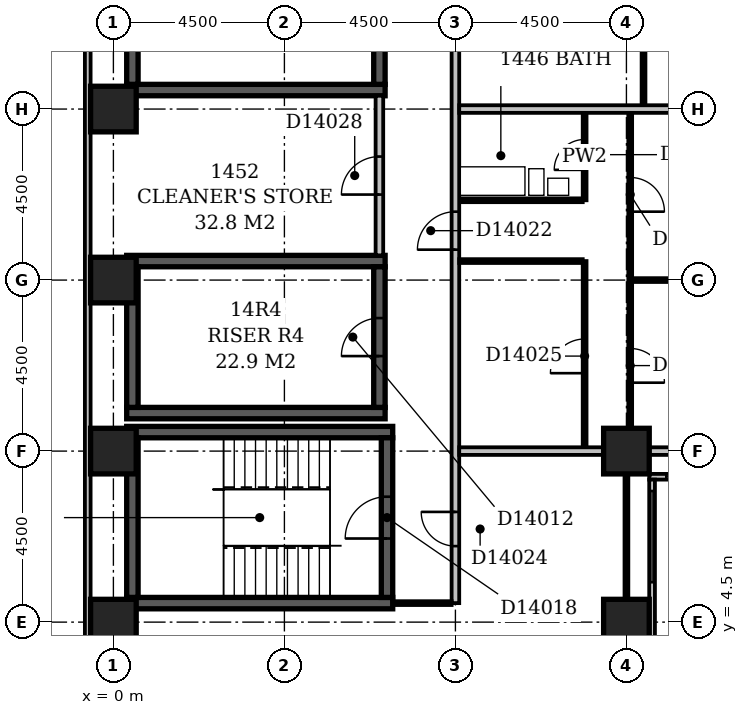
"""IFC4 building model, lengths in metres.
Left out: names, types, materials, properties, quantities, classifications, styles, units other than length and angle.
Written with IfcOpenShell. Run it as: python <this file> out.ifc"""

import sys

from ifc_helpers import new_model, si_unit, direction, frame, frame_2d, origin, origin_2d, place, context, subcontext, project, spatial, rectangle, extrude, element, fill, save


model = new_model("IFC4")
c1 = context("Model", 3, precision=1e-05, world=origin(), true_north=direction((0.0, 1.0)))
c2 = subcontext(c1, "Body", "Model", "MODEL_VIEW")
j1 = project(units=[si_unit("LENGTHUNIT", "METRE"), si_unit("PLANEANGLEUNIT", "RADIAN")], contexts=[c1])
p1 = place(None, origin())
s1 = spatial("IfcSite", under=j1, at=p1, CompositionType="ELEMENT")
p2 = place(p1, origin())
s2 = spatial("IfcBuilding", under=s1, at=p2, CompositionType="ELEMENT")
p3 = place(p2, frame((0.0, 0.0, 61.4)))
s3 = spatial("IfcBuildingStorey", under=s2, at=p3, CompositionType="ELEMENT", Elevation=61.4)
for number, where, z_axis, x_axis in (
    (1, (0.35, 5.0, -0.3), (0.0, 0.0, 1.0), (1.0, 0.0, 0.0)),
    (2, (0.35, 9.5, -0.3), (0.0, 0.0, 1.0), (1.0, 0.0, 0.0)),
):
    element("IfcWall", number, at=place(p3, frame(where, z_axis=z_axis, x_axis=x_axis)), inside=s3, PredefinedType="SHEAR", context=c2, shape_type="SweptSolid", body=[
        extrude(rectangle(XDim=7.0, YDim=0.3, at=frame_2d((3.5, 0.0))), origin(), (0.0, 0.0, 1.0), 3.6),
    ])
for number, where, z_axis, x_axis in (
    (3, (0.35, 10.0, -0.3), (0.0, 0.0, 1.0), (1.0, 0.0, 0.0)),
    (4, (0.35, 14.0, -0.3), (0.0, 0.0, 1.0), (1.0, 0.0, 0.0)),
    (5, (0.35, 18.5, -0.3), (0.0, 0.0, 1.0), (1.0, 0.0, 0.0)),
):
    element("IfcWall", number, at=place(p3, frame(where, z_axis=z_axis, x_axis=x_axis)), inside=s3, PredefinedType="SHEAR", context=c2, shape_type="SweptSolid", body=[
        extrude(rectangle(XDim=6.8, YDim=0.3, at=frame_2d((3.4, 0.0))), origin(), (0.0, 0.0, 1.0), 3.6),
    ])
p4 = place(p3, frame((0.5, 5.15, -0.3), z_axis=(0.0, 0.0, 1.0), x_axis=(0.0, 1.0, 0.0)))
e6 = element("IfcWall", 6, at=p4, inside=s3, PredefinedType="SHEAR", context=c2, shape_type="SweptSolid", body=[
    extrude(rectangle(XDim=4.2, YDim=0.3, at=frame_2d((2.1, 0.0))), origin(), (0.0, 0.0, 1.0), 3.6),
])
for number, where, z_axis, x_axis in (
    (7, (0.5, 10.15, -0.3), (0.0, 0.0, 1.0), (0.0, 1.0, 0.0)),
    (8, (0.5, 18.65, -0.3), (0.0, 0.0, 1.0), (0.0, 1.0, 0.0)),
):
    element("IfcWall", number, at=place(p3, frame(where, z_axis=z_axis, x_axis=x_axis)), inside=s3, PredefinedType="SHEAR", context=c2, shape_type="SweptSolid", body=[
        extrude(rectangle(XDim=3.7, YDim=0.3, at=frame_2d((1.85, 0.0))), origin(), (0.0, 0.0, 1.0), 3.6),
    ])
p5 = place(p3, frame((7.0, 10.15, -0.3), z_axis=(0.0, 0.0, 1.0), x_axis=(0.0, 1.0, 0.0)))
e9 = element("IfcWall", 9, at=p5, inside=s3, PredefinedType="SHEAR", context=c2, shape_type="SweptSolid", body=[
    extrude(rectangle(XDim=3.7, YDim=0.3, at=frame_2d((1.85, 0.0))), origin(), (0.0, 0.0, 1.0), 3.6),
])
p6 = place(p5, frame((1.35, 0.0, 0.3)))
e10 = element("IfcOpeningElement", 10, at=p6, cuts=e9, PredefinedType="OPENING", context=c2, shape_type="SweptSolid", body=[
    extrude(rectangle(XDim=1.0, YDim=2.1, at=frame_2d((0.5, 1.05))), frame((0.0, 0.162, 0.0), z_axis=(0.0, -1.0, 0.0), x_axis=(1.0, 0.0, 0.0)), (0.0, 0.0, 1.0), 0.324),
])
p7 = place(p3, frame((7.0, 18.65, -0.3), z_axis=(0.0, 0.0, 1.0), x_axis=(0.0, 1.0, 0.0)))
e11 = element("IfcWall", 11, at=p7, inside=s3, PredefinedType="SHEAR", context=c2, shape_type="SweptSolid", body=[
    extrude(rectangle(XDim=3.7, YDim=0.3, at=frame_2d((1.85, 0.0))), origin(), (0.0, 0.0, 1.0), 3.6),
])
p8 = place(p7, frame((1.35, 0.0, 0.3)))
e12 = element("IfcOpeningElement", 12, at=p8, cuts=e11, PredefinedType="OPENING", context=c2, shape_type="SweptSolid", body=[
    extrude(rectangle(XDim=1.0, YDim=2.1, at=frame_2d((0.5, 1.05))), frame((0.0, 0.162, 0.0), z_axis=(0.0, -1.0, 0.0), x_axis=(1.0, 0.0, 0.0)), (0.0, 0.0, 1.0), 0.324),
])
p9 = place(p3, frame((7.2, 5.15, -0.3), z_axis=(0.0, 0.0, 1.0), x_axis=(0.0, 1.0, 0.0)))
e13 = element("IfcWall", 13, at=p9, inside=s3, PredefinedType="SHEAR", context=c2, shape_type="SweptSolid", body=[
    extrude(rectangle(XDim=4.2, YDim=0.3, at=frame_2d((2.1, 0.0))), origin(), (0.0, 0.0, 1.0), 3.6),
])
p10 = place(p9, frame((1.55, 0.0, 0.3)))
e14 = element("IfcOpeningElement", 14, at=p10, cuts=e13, PredefinedType="OPENING", context=c2, shape_type="SweptSolid", body=[
    extrude(rectangle(XDim=1.1, YDim=2.1, at=frame_2d((0.55, 1.05))), frame((0.0, 0.162, 0.0), z_axis=(0.0, -1.0, 0.0), x_axis=(1.0, 0.0, 0.0)), (0.0, 0.0, 1.0), 0.324),
])
for number, where, z_axis, x_axis in (
    (15, (0.0, 4.5, -0.3), (0.0, 0.0, 1.0), (1.0, 0.0, 0.0)),
    (16, (13.5, 4.5, -0.3), (0.0, 0.0, 1.0), (1.0, 0.0, 0.0)),
    (17, (0.0, 9.0, -0.3), (0.0, 0.0, 1.0), (1.0, 0.0, 0.0)),
    (18, (13.5, 9.0, -0.3), (0.0, 0.0, 1.0), (1.0, 0.0, 0.0)),
    (19, (0.0, 13.5, -0.3), (0.0, 0.0, 1.0), (1.0, 0.0, 0.0)),
    (20, (0.0, 18.0, -0.3), (0.0, 0.0, 1.0), (1.0, 0.0, 0.0)),
):
    element("IfcColumn", number, at=place(p3, frame(where, z_axis=z_axis, x_axis=x_axis)), inside=s3, PredefinedType="COLUMN", context=c2, shape_type="SweptSolid", body=[
        extrude(rectangle(XDim=1.2, YDim=1.2, at=origin_2d()), origin(), (0.0, 0.0, 1.0), 3.6),
    ])
p11 = place(p3, frame((14.175, 3.9, 0.0), z_axis=(0.0, 0.0, 1.0), x_axis=(0.0, 1.0, 0.0)))
e21 = element("IfcWall", 21, at=p11, inside=s3, PredefinedType="STANDARD", context=c2, shape_type="SweptSolid", body=[
    extrude(rectangle(XDim=4.35, YDim=0.15, at=frame_2d((2.175, 0.0))), origin(), (0.0, 0.0, 1.0), 2.7),
])
p12 = place(p11, frame((1.65, 0.0, 0.6)))
e22 = element("IfcOpeningElement", 22, at=p12, cuts=e21, PredefinedType="OPENING", context=c2, shape_type="SweptSolid", body=[
    extrude(rectangle(XDim=2.4, YDim=1.8, at=frame_2d((1.2, 0.9))), frame((0.0, 0.087, 0.0), z_axis=(0.0, -1.0, 0.0), x_axis=(1.0, 0.0, 0.0)), (0.0, 0.0, 1.0), 0.174),
])
p13 = place(p3, frame((14.1, 8.325, 0.0), z_axis=(0.0, 0.0, 1.0), x_axis=(1.0, 0.0, 0.0)))
e23 = element("IfcWall", 23, at=p13, inside=s3, PredefinedType="STANDARD", context=c2, shape_type="SweptSolid", body=[
    extrude(rectangle(XDim=4.65, YDim=0.15, at=frame_2d((2.325, 0.0))), origin(), (0.0, 0.0, 1.0), 2.7),
])
p14 = place(p13, frame((0.45, 0.0, 0.6)))
e24 = element("IfcOpeningElement", 24, at=p14, cuts=e23, PredefinedType="OPENING", context=c2, shape_type="SweptSolid", body=[
    extrude(rectangle(XDim=2.4, YDim=1.8, at=frame_2d((1.2, 0.9))), frame((0.0, 0.087, 0.0), z_axis=(0.0, -1.0, 0.0), x_axis=(1.0, 0.0, 0.0)), (0.0, 0.0, 1.0), 0.174),
])
p15 = place(p3, frame((-0.675, 59.1, 0.0), z_axis=(0.0, 0.0, 1.0), x_axis=(0.0, -1.0, 0.0)))
e25 = element("IfcWall", 25, at=p15, inside=s3, PredefinedType="STANDARD", context=c2, shape_type="SweptSolid", body=[
    extrude(rectangle(XDim=55.35, YDim=0.15, at=frame_2d((27.675, 0.0))), origin(), (0.0, 0.0, 1.0), 2.7),
])
p16 = place(p15, frame((10.65, 0.0, 0.6)))
e26 = element("IfcOpeningElement", 26, at=p16, cuts=e25, PredefinedType="OPENING", context=c2, shape_type="SweptSolid", body=[
    extrude(rectangle(XDim=2.4, YDim=1.8, at=frame_2d((1.2, 0.9))), frame((0.0, 0.087, 0.0), z_axis=(0.0, -1.0, 0.0), x_axis=(1.0, 0.0, 0.0)), (0.0, 0.0, 1.0), 0.174),
])
p17 = place(p15, frame((15.15, 0.0, 0.6)))
e27 = element("IfcOpeningElement", 27, at=p17, cuts=e25, PredefinedType="OPENING", context=c2, shape_type="SweptSolid", body=[
    extrude(rectangle(XDim=2.4, YDim=1.8, at=frame_2d((1.2, 0.9))), frame((0.0, 0.087, 0.0), z_axis=(0.0, -1.0, 0.0), x_axis=(1.0, 0.0, 0.0)), (0.0, 0.0, 1.0), 0.174),
])
p18 = place(p15, frame((20.67, 0.0, 0.6)))
e28 = element("IfcOpeningElement", 28, at=p18, cuts=e25, PredefinedType="OPENING", context=c2, shape_type="SweptSolid", body=[
    extrude(rectangle(XDim=1.5, YDim=1.8, at=frame_2d((0.75, 0.9))), frame((0.0, 0.087, 0.0), z_axis=(0.0, -1.0, 0.0), x_axis=(1.0, 0.0, 0.0)), (0.0, 0.0, 1.0), 0.174),
])
p19 = place(p3, frame((0.0, 4.4, 0.0), z_axis=(0.0, 0.0, 1.0), x_axis=(0.0, 1.0, 0.0)))
e29 = element("IfcWall", 29, at=p19, inside=s3, PredefinedType="PARTITIONING", context=c2, shape_type="SweptSolid", body=[
    extrude(rectangle(XDim=0.7, YDim=0.1, at=frame_2d((0.35, 0.0))), origin(), (0.0, 0.0, 1.0), 2.7),
])
p20 = place(p3, frame((7.349, 5.0, 0.0), z_axis=(0.0, 0.0, 1.0), x_axis=(1.0, 0.0, 0.0)))
e30 = element("IfcWall", 30, at=p20, inside=s3, PredefinedType="PARTITIONING", context=c2, shape_type="SweptSolid", body=[
    extrude(rectangle(XDim=1.551, YDim=0.1, at=frame_2d((0.775, 0.0))), origin(), (0.0, 0.0, 1.0), 3.3),
])
p21 = place(p3, frame((9.0, 5.0, 0.0), z_axis=(0.0, 0.0, 1.0), x_axis=(0.0, 1.0, 0.0)))
e31 = element("IfcWall", 31, at=p21, inside=s3, PredefinedType="PARTITIONING", context=c2, shape_type="SweptSolid", body=[
    extrude(rectangle(XDim=44.5, YDim=0.2, at=frame_2d((22.25, 0.0))), origin(), (0.0, 0.0, 1.0), 3.3),
])
p22 = place(p21, frame((28.05, 0.0, 0.0)))
e32 = element("IfcOpeningElement", 32, at=p22, cuts=e31, PredefinedType="OPENING", context=c2, shape_type="SweptSolid", body=[
    extrude(rectangle(XDim=1.0, YDim=2.1, at=frame_2d((0.5, 1.05))), frame((0.0, 0.112, 0.0), z_axis=(0.0, -1.0, 0.0), x_axis=(1.0, 0.0, 0.0)), (0.0, 0.0, 1.0), 0.224),
])
p23 = place(p21, frame((23.95, 0.0, 0.0)))
e33 = element("IfcOpeningElement", 33, at=p23, cuts=e31, PredefinedType="OPENING", context=c2, shape_type="SweptSolid", body=[
    extrude(rectangle(XDim=1.0, YDim=2.1, at=frame_2d((0.5, 1.05))), frame((0.0, 0.112, 0.0), z_axis=(0.0, -1.0, 0.0), x_axis=(1.0, 0.0, 0.0)), (0.0, 0.0, 1.0), 0.224),
])
p24 = place(p21, frame((18.3, 0.0, 0.0)))
e34 = element("IfcOpeningElement", 34, at=p24, cuts=e31, PredefinedType="OPENING", context=c2, shape_type="SweptSolid", body=[
    extrude(rectangle(XDim=1.0, YDim=2.1, at=frame_2d((0.5, 1.05))), frame((0.0, 0.112, 0.0), z_axis=(0.0, -1.0, 0.0), x_axis=(1.0, 0.0, 0.0)), (0.0, 0.0, 1.0), 0.224),
])
p25 = place(p21, frame((9.3, 0.0, 0.0)))
e35 = element("IfcOpeningElement", 35, at=p25, cuts=e31, PredefinedType="OPENING", context=c2, shape_type="SweptSolid", body=[
    extrude(rectangle(XDim=1.0, YDim=2.1, at=frame_2d((0.5, 1.05))), frame((0.0, 0.112, 0.0), z_axis=(0.0, -1.0, 0.0), x_axis=(1.0, 0.0, 0.0)), (0.0, 0.0, 1.0), 0.224),
])
p26 = place(p21, frame((32.75, 0.0, 0.0)))
e36 = element("IfcOpeningElement", 36, at=p26, cuts=e31, PredefinedType="OPENING", context=c2, shape_type="SweptSolid", body=[
    extrude(rectangle(XDim=0.9, YDim=2.1, at=frame_2d((0.45, 1.05))), frame((0.0, 0.112, 0.0), z_axis=(0.0, -1.0, 0.0), x_axis=(1.0, 0.0, 0.0)), (0.0, 0.0, 1.0), 0.224),
])
p27 = place(p21, frame((1.5, 0.0, 0.0)))
e37 = element("IfcOpeningElement", 37, at=p27, cuts=e31, PredefinedType="OPENING", context=c2, shape_type="SweptSolid", body=[
    extrude(rectangle(XDim=0.9, YDim=2.1, at=frame_2d((0.45, 1.05))), frame((0.0, 0.112, 0.0), z_axis=(0.0, -1.0, 0.0), x_axis=(1.0, 0.0, 0.0)), (0.0, 0.0, 1.0), 0.224),
])
p28 = place(p3, frame((13.5, 5.1, 0.0), z_axis=(0.0, 0.0, 1.0), x_axis=(0.0, 1.0, 0.0)))
e38 = element("IfcWall", 38, at=p28, inside=s3, PredefinedType="PARTITIONING", context=c2, shape_type="SweptSolid", body=[
    extrude(rectangle(XDim=3.3, YDim=0.1, at=frame_2d((1.65, 0.0))), origin(), (0.0, 0.0, 1.0), 2.7),
])
p29 = place(p3, frame((9.1, 9.0, 0.0), z_axis=(0.0, 0.0, 1.0), x_axis=(1.0, 0.0, 0.0)))
e39 = element("IfcWall", 39, at=p29, inside=s3, PredefinedType="PARTITIONING", context=c2, shape_type="SweptSolid", body=[
    extrude(rectangle(XDim=3.8, YDim=0.2, at=frame_2d((1.9, 0.0))), origin(), (0.0, 0.0, 1.0), 3.3),
])
p30 = place(p3, frame((14.1, 9.0, 0.0), z_axis=(0.0, 0.0, 1.0), x_axis=(1.0, 0.0, 0.0)))
e40 = element("IfcWall", 40, at=p30, inside=s3, PredefinedType="PARTITIONING", context=c2, shape_type="SweptSolid", body=[
    extrude(rectangle(XDim=3.3, YDim=0.2, at=frame_2d((1.65, 0.0))), origin(), (0.0, 0.0, 1.0), 2.7),
])
p31 = place(p3, frame((12.4, 9.1, 0.0), z_axis=(0.0, 0.0, 1.0), x_axis=(0.0, 1.0, 0.0)))
e41 = element("IfcWall", 41, at=p31, inside=s3, PredefinedType="PARTITIONING", context=c2, shape_type="SweptSolid", body=[
    extrude(rectangle(XDim=4.9, YDim=0.1, at=frame_2d((2.45, 0.0))), origin(), (0.0, 0.0, 1.0), 3.3),
])
p32 = place(p31, frame((1.95, 0.0, 0.0)))
e42 = element("IfcOpeningElement", 42, at=p32, cuts=e41, PredefinedType="OPENING", context=c2, shape_type="SweptSolid", body=[
    extrude(rectangle(XDim=0.9, YDim=2.1, at=frame_2d((0.45, 1.05))), frame((0.0, 0.062, 0.0), z_axis=(0.0, -1.0, 0.0), x_axis=(1.0, 0.0, 0.0)), (0.0, 0.0, 1.0), 0.124),
])
p33 = place(p3, frame((13.6, 9.6, 0.0), z_axis=(0.0, 0.0, 1.0), x_axis=(0.0, 1.0, 0.0)))
e43 = element("IfcWall", 43, at=p33, inside=s3, PredefinedType="PARTITIONING", context=c2, shape_type="SweptSolid", body=[
    extrude(rectangle(XDim=8.3, YDim=0.1, at=frame_2d((4.15, 0.0))), origin(), (0.0, 0.0, 1.0), 3.3),
])
p34 = place(p33, frame((1.2, 0.0, 0.0)))
e44 = element("IfcOpeningElement", 44, at=p34, cuts=e43, PredefinedType="OPENING", context=c2, shape_type="SweptSolid", body=[
    extrude(rectangle(XDim=0.9, YDim=2.1, at=frame_2d((0.45, 1.05))), frame((0.0, 0.062, 0.0), z_axis=(0.0, -1.0, 0.0), x_axis=(1.0, 0.0, 0.0)), (0.0, 0.0, 1.0), 0.124),
])
p35 = place(p33, frame((5.7, 0.0, 0.0)))
e45 = element("IfcOpeningElement", 45, at=p35, cuts=e43, PredefinedType="OPENING", context=c2, shape_type="SweptSolid", body=[
    extrude(rectangle(XDim=0.9, YDim=2.1, at=frame_2d((0.45, 1.05))), frame((0.0, 0.062, 0.0), z_axis=(0.0, -1.0, 0.0), x_axis=(1.0, 0.0, 0.0)), (0.0, 0.0, 1.0), 0.124),
])
p36 = place(p3, frame((13.65, 13.5, 0.0), z_axis=(0.0, 0.0, 1.0), x_axis=(1.0, 0.0, 0.0)))
e46 = element("IfcWall", 46, at=p36, inside=s3, PredefinedType="PARTITIONING", context=c2, shape_type="SweptSolid", body=[
    extrude(rectangle(XDim=3.75, YDim=0.1, at=frame_2d((1.875, 0.0))), origin(), (0.0, 0.0, 1.0), 3.3),
])
p37 = place(p3, frame((9.1, 14.0, 0.0), z_axis=(0.0, 0.0, 1.0), x_axis=(1.0, 0.0, 0.0)))
e47 = element("IfcWall", 47, at=p37, inside=s3, PredefinedType="PARTITIONING", context=c2, shape_type="SweptSolid", body=[
    extrude(rectangle(XDim=3.25, YDim=0.1, at=frame_2d((1.625, 0.0))), origin(), (0.0, 0.0, 1.0), 3.3),
])
p38 = place(p3, frame((7.0, 14.15, 0.0), z_axis=(0.0, 0.0, 1.0), x_axis=(0.0, 1.0, 0.0)))
e48 = element("IfcWall", 48, at=p38, inside=s3, PredefinedType="PARTITIONING", context=c2, shape_type="SweptSolid", body=[
    extrude(rectangle(XDim=4.2, YDim=0.2, at=frame_2d((2.1, 0.0))), origin(), (0.0, 0.0, 1.0), 3.3),
])
p39 = place(p38, frame((1.6, 0.0, 0.0)))
e49 = element("IfcOpeningElement", 49, at=p39, cuts=e48, PredefinedType="OPENING", context=c2, shape_type="SweptSolid", body=[
    extrude(rectangle(XDim=1.0, YDim=2.1, at=frame_2d((0.5, 1.05))), frame((0.0, 0.112, 0.0), z_axis=(0.0, -1.0, 0.0), x_axis=(1.0, 0.0, 0.0)), (0.0, 0.0, 1.0), 0.224),
])
p40 = place(p3, frame((9.1, 15.6, 0.0), z_axis=(0.0, 0.0, 1.0), x_axis=(1.0, 0.0, 0.0)))
e50 = element("IfcWall", 50, at=p40, inside=s3, PredefinedType="PLUMBINGWALL", context=c2, shape_type="SweptSolid", body=[
    extrude(rectangle(XDim=3.25, YDim=0.1, at=frame_2d((1.625, 0.0))), origin(), (0.0, 0.0, 1.0), 3.3),
])
p41 = place(p3, frame((12.4, 15.6, 0.0), z_axis=(0.0, 0.0, 1.0), x_axis=(0.0, 1.0, 0.0)))
e51 = element("IfcWall", 51, at=p41, inside=s3, PredefinedType="PARTITIONING", context=c2, shape_type="SweptSolid", body=[
    extrude(rectangle(XDim=2.3, YDim=0.1, at=frame_2d((1.15, 0.0))), origin(), (0.0, 0.0, 1.0), 3.3),
])
p42 = place(p41, frame((0.8, 0.0, 0.0)))
e52 = element("IfcOpeningElement", 52, at=p42, cuts=e51, PredefinedType="OPENING", context=c2, shape_type="SweptSolid", body=[
    extrude(rectangle(XDim=0.8, YDim=2.1, at=frame_2d((0.4, 1.05))), frame((0.0, 0.062, 0.0), z_axis=(0.0, -1.0, 0.0), x_axis=(1.0, 0.0, 0.0)), (0.0, 0.0, 1.0), 0.124),
])
p43 = place(p3, frame((9.1, 18.0, 0.0), z_axis=(0.0, 0.0, 1.0), x_axis=(1.0, 0.0, 0.0)))
e53 = element("IfcWall", 53, at=p43, inside=s3, PredefinedType="PARTITIONING", context=c2, shape_type="SweptSolid", body=[
    extrude(rectangle(XDim=8.3, YDim=0.2, at=frame_2d((4.15, 0.0))), origin(), (0.0, 0.0, 1.0), 2.6),
])
p44 = place(p3, frame((13.95, 18.1, 0.0), z_axis=(0.0, 0.0, 1.0), x_axis=(0.0, 1.0, 0.0)))
e54 = element("IfcWall", 54, at=p44, inside=s3, PredefinedType="PARTITIONING", context=c2, shape_type="SweptSolid", body=[
    extrude(rectangle(XDim=4.9, YDim=0.1, at=frame_2d((2.45, 0.0))), origin(), (0.0, 0.0, 1.0), 3.3),
])
p45 = place(p44, frame((1.95, 0.0, 0.0)))
e55 = element("IfcOpeningElement", 55, at=p45, cuts=e54, PredefinedType="OPENING", context=c2, shape_type="SweptSolid", body=[
    extrude(rectangle(XDim=0.9, YDim=2.1, at=frame_2d((0.45, 1.05))), frame((0.0, 0.062, 0.0), z_axis=(0.0, -1.0, 0.0), x_axis=(1.0, 0.0, 0.0)), (0.0, 0.0, 1.0), 0.124),
])
p46 = place(p12, origin())
e56 = element("IfcWindow", 56, at=p46, inside=s3, PartitioningType="SINGLE_PANEL", PredefinedType="WINDOW", context=c2, shape_type="SweptSolid", body=[
    extrude(rectangle(XDim=2.4, YDim=1.8, at=frame_2d((1.2, 0.9))), frame((0.0, 0.03, 0.0), z_axis=(0.0, -1.0, 0.0), x_axis=(1.0, 0.0, 0.0)), (0.0, 0.0, 1.0), 0.06),
])
fill(e22, e56)
p47 = place(p14, origin())
e57 = element("IfcWindow", 57, at=p47, inside=s3, PartitioningType="SINGLE_PANEL", PredefinedType="WINDOW", context=c2, shape_type="SweptSolid", body=[
    extrude(rectangle(XDim=2.4, YDim=1.8, at=frame_2d((1.2, 0.9))), frame((0.0, 0.03, 0.0), z_axis=(0.0, -1.0, 0.0), x_axis=(1.0, 0.0, 0.0)), (0.0, 0.0, 1.0), 0.06),
])
fill(e24, e57)
p48 = place(p6, origin())
e58 = element("IfcDoor", 58, at=p48, inside=s3, OperationType="SINGLE_SWING_LEFT", PredefinedType="DOOR", context=c2, shape_type="SweptSolid", body=[
    extrude(rectangle(XDim=1.0, YDim=2.1, at=frame_2d((0.5, 1.05))), frame((0.0, 0.025, 0.0), z_axis=(0.0, -1.0, 0.0), x_axis=(1.0, 0.0, 0.0)), (0.0, 0.0, 1.0), 0.05),
])
fill(e10, e58)
p49 = place(p10, origin())
e59 = element("IfcDoor", 59, at=p49, inside=s3, OperationType="SINGLE_SWING_LEFT", PredefinedType="DOOR", context=c2, shape_type="SweptSolid", body=[
    extrude(rectangle(XDim=1.1, YDim=2.1, at=frame_2d((0.55, 1.05))), frame((0.0, 0.025, 0.0), z_axis=(0.0, -1.0, 0.0), x_axis=(1.0, 0.0, 0.0)), (0.0, 0.0, 1.0), 0.05),
])
fill(e14, e59)
p50 = place(p25, origin())
e60 = element("IfcDoor", 60, at=p50, inside=s3, OperationType="SINGLE_SWING_LEFT", PredefinedType="DOOR", context=c2, shape_type="SweptSolid", body=[
    extrude(rectangle(XDim=1.0, YDim=2.1, at=frame_2d((0.5, 1.05))), frame((0.0, 0.025, 0.0), z_axis=(0.0, -1.0, 0.0), x_axis=(1.0, 0.0, 0.0)), (0.0, 0.0, 1.0), 0.05),
])
fill(e35, e60)
p51 = place(p27, frame((0.9, 0.0, 0.0), z_axis=(0.0, 0.0, 1.0), x_axis=(-1.0, 0.0, 0.0)))
e61 = element("IfcDoor", 61, at=p51, inside=s3, OperationType="SINGLE_SWING_LEFT", PredefinedType="DOOR", context=c2, shape_type="SweptSolid", body=[
    extrude(rectangle(XDim=0.9, YDim=2.1, at=frame_2d((0.45, 1.05))), frame((0.0, 0.025, 0.0), z_axis=(0.0, -1.0, 0.0), x_axis=(1.0, 0.0, 0.0)), (0.0, 0.0, 1.0), 0.05),
])
fill(e37, e61)
p52 = place(p32, origin())
e62 = element("IfcDoor", 62, at=p52, inside=s3, OperationType="SINGLE_SWING_LEFT", PredefinedType="DOOR", context=c2, shape_type="SweptSolid", body=[
    extrude(rectangle(XDim=0.9, YDim=2.1, at=frame_2d((0.45, 1.05))), frame((0.0, 0.025, 0.0), z_axis=(0.0, -1.0, 0.0), x_axis=(1.0, 0.0, 0.0)), (0.0, 0.0, 1.0), 0.05),
])
fill(e42, e62)
p53 = place(p34, frame((0.9, 0.0, 0.0), z_axis=(0.0, 0.0, 1.0), x_axis=(-1.0, 0.0, 0.0)))
e63 = element("IfcDoor", 63, at=p53, inside=s3, OperationType="SINGLE_SWING_RIGHT", PredefinedType="DOOR", context=c2, shape_type="SweptSolid", body=[
    extrude(rectangle(XDim=0.9, YDim=2.1, at=frame_2d((0.45, 1.05))), frame((0.0, 0.025, 0.0), z_axis=(0.0, -1.0, 0.0), x_axis=(1.0, 0.0, 0.0)), (0.0, 0.0, 1.0), 0.05),
])
fill(e44, e63)
p54 = place(p35, frame((0.9, 0.0, 0.0), z_axis=(0.0, 0.0, 1.0), x_axis=(-1.0, 0.0, 0.0)))
e64 = element("IfcDoor", 64, at=p54, inside=s3, OperationType="SINGLE_SWING_RIGHT", PredefinedType="DOOR", context=c2, shape_type="SweptSolid", body=[
    extrude(rectangle(XDim=0.9, YDim=2.1, at=frame_2d((0.45, 1.05))), frame((0.0, 0.025, 0.0), z_axis=(0.0, -1.0, 0.0), x_axis=(1.0, 0.0, 0.0)), (0.0, 0.0, 1.0), 0.05),
])
fill(e45, e64)
p55 = place(p39, origin())
e65 = element("IfcDoor", 65, at=p55, inside=s3, OperationType="SINGLE_SWING_LEFT", PredefinedType="DOOR", context=c2, shape_type="SweptSolid", body=[
    extrude(rectangle(XDim=1.0, YDim=2.1, at=frame_2d((0.5, 1.05))), frame((0.0, 0.025, 0.0), z_axis=(0.0, -1.0, 0.0), x_axis=(1.0, 0.0, 0.0)), (0.0, 0.0, 1.0), 0.05),
])
fill(e49, e65)
p56 = place(p42, origin())
e66 = element("IfcDoor", 66, at=p56, inside=s3, OperationType="SINGLE_SWING_LEFT", PredefinedType="DOOR", context=c2, shape_type="SweptSolid", body=[
    extrude(rectangle(XDim=0.8, YDim=2.1, at=frame_2d((0.4, 1.05))), frame((0.0, 0.025, 0.0), z_axis=(0.0, -1.0, 0.0), x_axis=(1.0, 0.0, 0.0)), (0.0, 0.0, 1.0), 0.05),
])
fill(e52, e66)
save(model, sys.argv[1])
